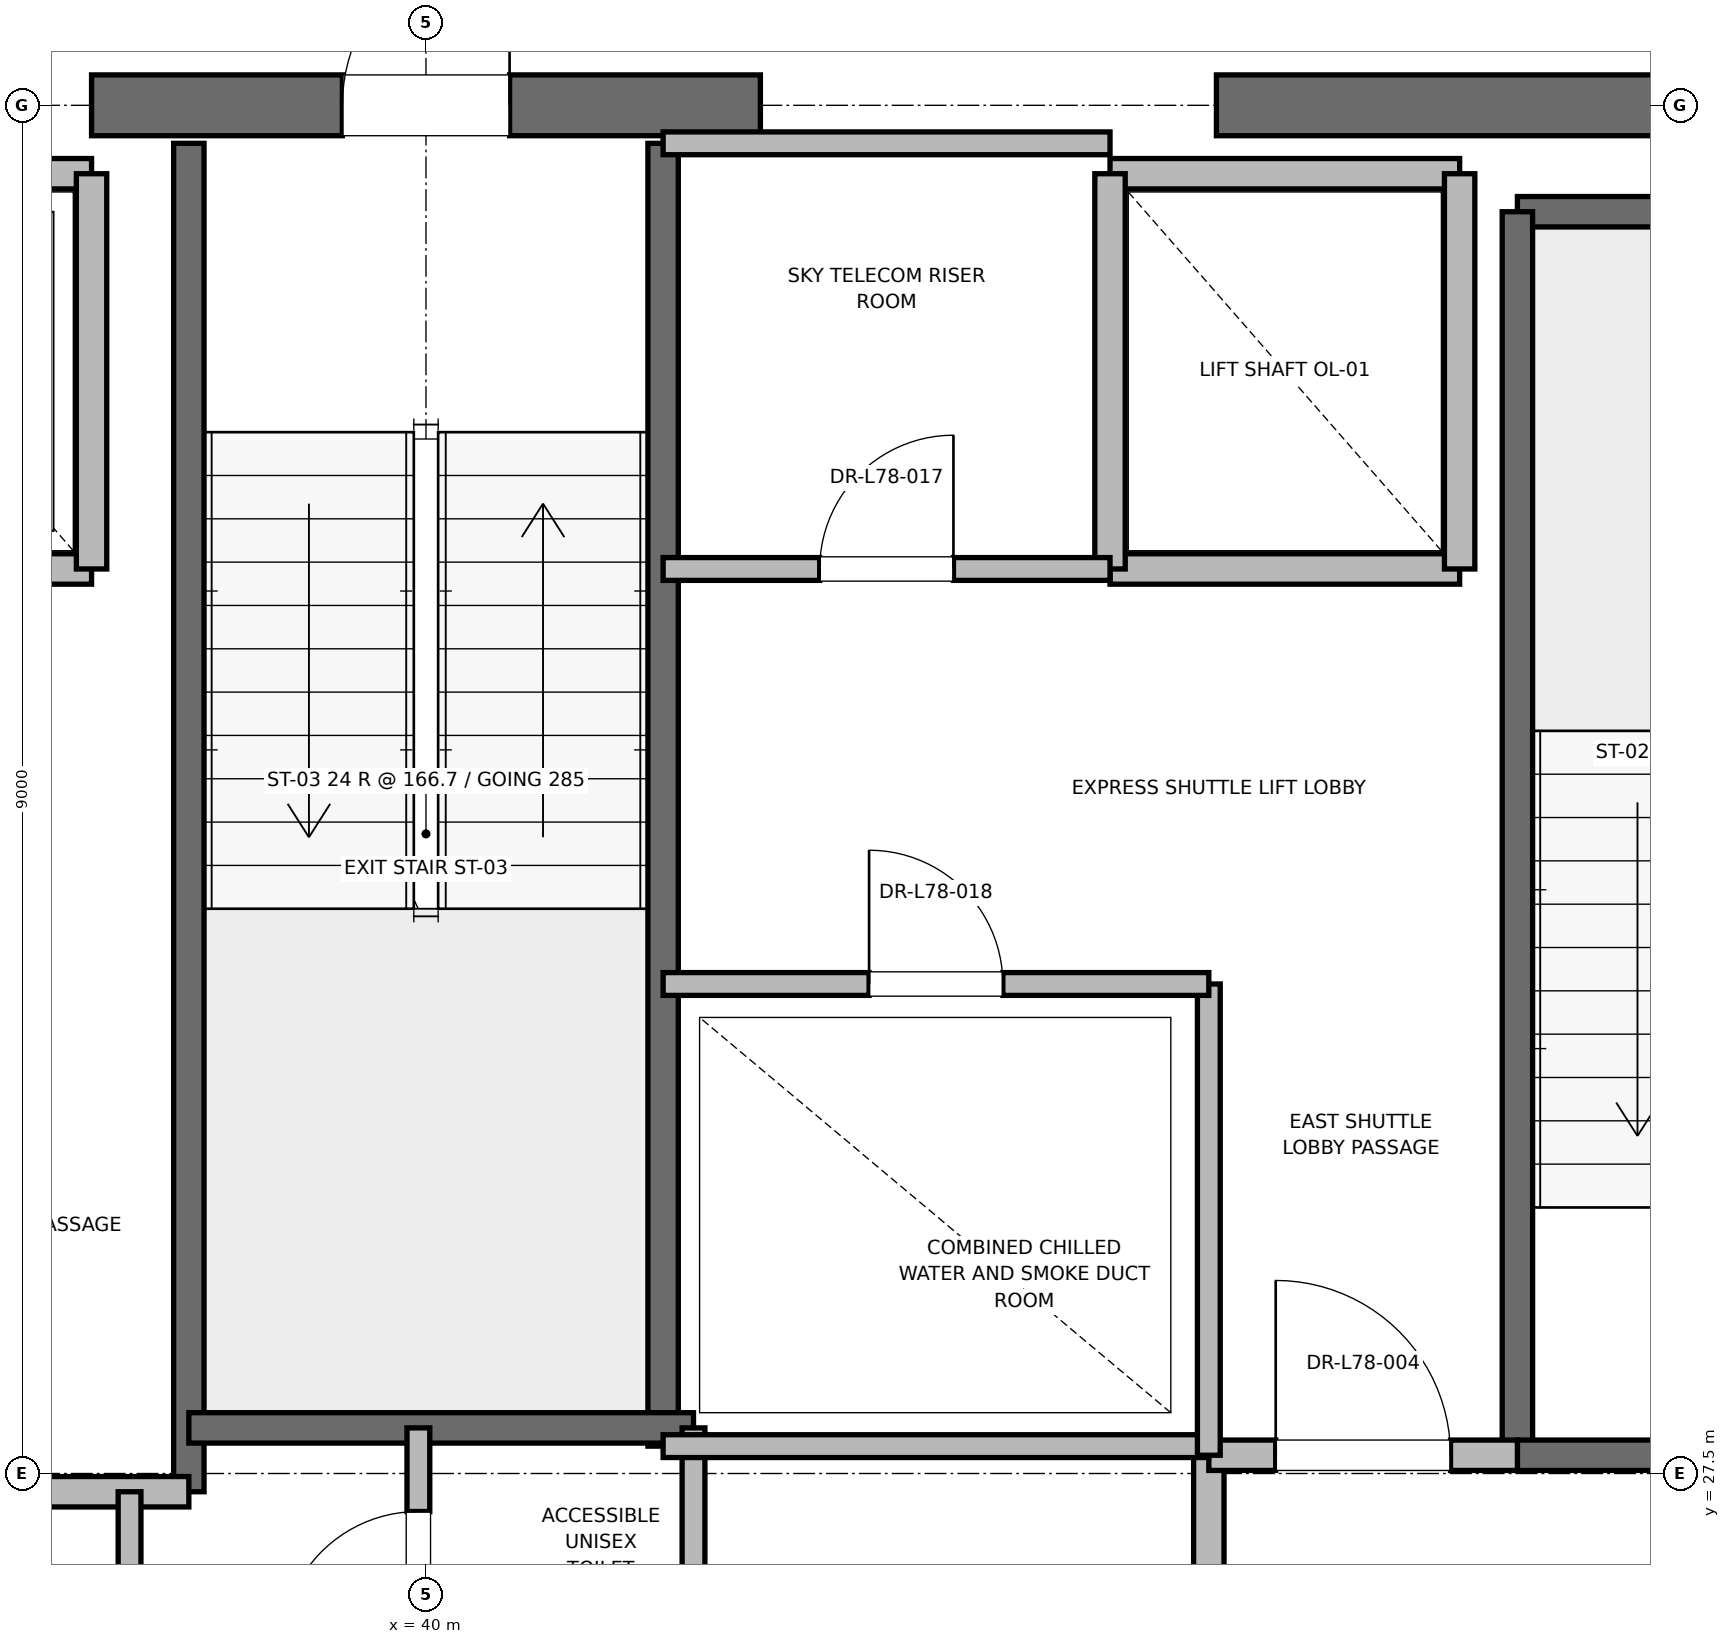
"""IFC4 building model, lengths in metres.
Left out: names, types, materials, properties, quantities, classifications, styles, units other than length and angle.
Written with IfcOpenShell. Run it as: python <this file> out.ifc"""

import sys

from ifc_helpers import new_model, si_unit, direction, frame, frame_2d, origin, place, context, subcontext, project, spatial, rectangle, extrude, element, fill, save


model = new_model("IFC4")
c1 = context("Model", 3, precision=1e-05, world=origin(), true_north=direction((0.0, 1.0)))
c2 = subcontext(c1, "Body", "Model", "MODEL_VIEW")
j1 = project(units=[si_unit("LENGTHUNIT", "METRE"), si_unit("PLANEANGLEUNIT", "RADIAN")], contexts=[c1])
p1 = place(None, origin())
s1 = spatial("IfcSite", under=j1, at=p1, CompositionType="ELEMENT")
p2 = place(p1, origin())
s2 = spatial("IfcBuilding", under=s1, at=p2, CompositionType="ELEMENT")
p3 = place(p2, frame((0.0, 0.0, 334.8)))
s3 = spatial("IfcBuildingStorey", under=s2, at=p3, CompositionType="ELEMENT", Elevation=334.8)
p4 = place(p3, frame((37.8, 36.5, 0.0), z_axis=(0.0, 0.0, 1.0), x_axis=(1.0, 0.0, 0.0)))
e1 = element("IfcWall", 1, at=p4, inside=s3, PredefinedType="SHEAR", context=c2, shape_type="SweptSolid", body=[
    extrude(rectangle(XDim=4.4, YDim=0.4, at=frame_2d((2.2, 0.0))), origin(), (0.0, 0.0, 1.0), 3.785),
])
p5 = place(p4, frame((1.65, 0.0, 0.0)))
e2 = element("IfcOpeningElement", 2, at=p5, cuts=e1, PredefinedType="OPENING", context=c2, shape_type="SweptSolid", body=[
    extrude(rectangle(XDim=1.1, YDim=2.15, at=frame_2d((0.55, 1.075))), frame((0.0, 0.2, 0.0), z_axis=(0.0, -1.0, 0.0), x_axis=(1.0, 0.0, 0.0)), (0.0, 0.0, 1.0), 0.4),
])
p6 = place(p3, frame((45.2, 36.5, 0.0), z_axis=(0.0, 0.0, 1.0), x_axis=(1.0, 0.0, 0.0)))
e3 = element("IfcWall", 3, at=p6, inside=s3, PredefinedType="SHEAR", context=c2, shape_type="SweptSolid", body=[
    extrude(rectangle(XDim=5.8, YDim=0.4, at=frame_2d((2.9, 0.0))), origin(), (0.0, 0.0, 1.0), 3.785),
])
p7 = place(p3, frame((47.18, 35.8, 0.0), z_axis=(0.0, 0.0, 1.0), x_axis=(1.0, 0.0, 0.0)))
e4 = element("IfcWall", 4, at=p7, inside=s3, PredefinedType="SOLIDWALL", context=c2, shape_type="SweptSolid", body=[
    extrude(rectangle(XDim=3.12, YDim=0.2, at=frame_2d((1.56, 0.0))), origin(), (0.0, 0.0, 1.0), 3.785),
])
p8 = place(p3, frame((47.18, 27.62, 0.0), z_axis=(0.0, 0.0, 1.0), x_axis=(0.0, 1.0, 0.0)))
e5 = element("IfcWall", 5, at=p8, inside=s3, PredefinedType="SOLIDWALL", context=c2, shape_type="SweptSolid", body=[
    extrude(rectangle(XDim=8.18, YDim=0.2, at=frame_2d((4.09, 0.0))), origin(), (0.0, 0.0, 1.0), 3.785),
])
p9 = place(p3, frame((47.18, 27.62, 0.0), z_axis=(0.0, 0.0, 1.0), x_axis=(1.0, 0.0, 0.0)))
e6 = element("IfcWall", 6, at=p9, inside=s3, PredefinedType="SOLIDWALL", context=c2, shape_type="SweptSolid", body=[
    extrude(rectangle(XDim=3.12, YDim=0.2, at=frame_2d((1.56, 0.0))), origin(), (0.0, 0.0, 1.0), 3.785),
])
p10 = place(p9, frame((1.01, 0.0, 0.0)))
e7 = element("IfcOpeningElement", 7, at=p10, cuts=e6, PredefinedType="OPENING", context=c2, shape_type="SweptSolid", body=[
    extrude(rectangle(XDim=1.1, YDim=2.15, at=frame_2d((0.55, 1.075))), frame((0.0, 0.1, 0.0), z_axis=(0.0, -1.0, 0.0), x_axis=(1.0, 0.0, 0.0)), (0.0, 0.0, 1.0), 0.2),
])
p11 = place(p3, frame((38.44, 27.38, 0.0), z_axis=(0.0, 0.0, 1.0), x_axis=(0.0, 1.0, 0.0)))
e8 = element("IfcWall", 8, at=p11, inside=s3, PredefinedType="SOLIDWALL", context=c2, shape_type="SweptSolid", body=[
    extrude(rectangle(XDim=8.87, YDim=0.2, at=frame_2d((4.435, 0.0))), origin(), (0.0, 0.0, 1.0), 3.785),
])
p12 = place(p3, frame((41.56, 27.68, 0.0), z_axis=(0.0, 0.0, 1.0), x_axis=(0.0, 1.0, 0.0)))
e9 = element("IfcWall", 9, at=p12, inside=s3, PredefinedType="SOLIDWALL", context=c2, shape_type="SweptSolid", body=[
    extrude(rectangle(XDim=8.57, YDim=0.2, at=frame_2d((4.285, 0.0))), origin(), (0.0, 0.0, 1.0), 3.785),
])
p13 = place(p3, frame((38.44, 27.8, 0.0), z_axis=(0.0, 0.0, 1.0), x_axis=(1.0, 0.0, 0.0)))
e10 = element("IfcWall", 10, at=p13, inside=s3, PredefinedType="SOLIDWALL", context=c2, shape_type="SweptSolid", body=[
    extrude(rectangle(XDim=3.32, YDim=0.2, at=frame_2d((1.66, 0.0))), origin(), (0.0, 0.0, 1.0), 3.785),
])
p14 = place(p3, frame((32.82, 27.38, 0.0), z_axis=(0.0, 0.0, 1.0), x_axis=(1.0, 0.0, 0.0)))
e11 = element("IfcWall", 11, at=p14, inside=s3, PredefinedType="PARTITIONING", context=c2, shape_type="SweptSolid", body=[
    extrude(rectangle(XDim=5.62, YDim=0.2, at=frame_2d((2.81, 0.0))), origin(), (0.0, 0.0, 1.0), 3.785),
])
p15 = place(p3, frame((45.15, 24.25, 0.0), z_axis=(0.0, 0.0, 1.0), x_axis=(0.0, 1.0, 0.0)))
e12 = element("IfcWall", 12, at=p15, inside=s3, PredefinedType="PARTITIONING", context=c2, shape_type="SweptSolid", body=[
    extrude(rectangle(XDim=3.37, YDim=0.2, at=frame_2d((1.685, 0.0))), origin(), (0.0, 0.0, 1.0), 3.785),
])
p16 = place(p3, frame((45.15, 27.62, 0.0), z_axis=(0.0, 0.0, 1.0), x_axis=(1.0, 0.0, 0.0)))
e13 = element("IfcWall", 13, at=p16, inside=s3, PredefinedType="PARTITIONING", context=c2, shape_type="SweptSolid", body=[
    extrude(rectangle(XDim=2.03, YDim=0.2, at=frame_2d((1.015, 0.0))), origin(), (0.0, 0.0, 1.0), 3.785),
])
p17 = place(p16, frame((0.44, 0.0, 0.0)))
e14 = element("IfcOpeningElement", 14, at=p17, cuts=e13, PredefinedType="OPENING", context=c2, shape_type="SweptSolid", body=[
    extrude(rectangle(XDim=1.15, YDim=2.2, at=frame_2d((0.575, 1.1))), frame((0.0, 0.1, 0.0), z_axis=(0.0, -1.0, 0.0), x_axis=(1.0, 0.0, 0.0)), (0.0, 0.0, 1.0), 0.2),
])
p18 = place(p3, frame((35.5, 33.45, 0.0), z_axis=(0.0, 0.0, 1.0), x_axis=(1.0, 0.0, 0.0)))
e15 = element("IfcWall", 15, at=p18, inside=s3, PredefinedType="SOLIDWALL", context=c2, shape_type="SweptSolid", body=[
    extrude(rectangle(XDim=2.3, YDim=0.2, at=frame_2d((1.15, 0.0))), origin(), (0.0, 0.0, 1.0), 3.785),
])
p19 = place(p18, frame((0.6, 0.0, 0.0)))
e16 = element("IfcOpeningElement", 16, at=p19, cuts=e15, PredefinedType="OPENING", context=c2, shape_type="SweptSolid", body=[
    extrude(rectangle(XDim=1.1, YDim=2.2, at=frame_2d((0.55, 1.1))), frame((0.0, 0.1, 0.0), z_axis=(0.0, -1.0, 0.0), x_axis=(1.0, 0.0, 0.0)), (0.0, 0.0, 1.0), 0.2),
])
p20 = place(p3, frame((37.8, 36.05, 0.0), z_axis=(0.0, 0.0, 1.0), x_axis=(-1.0, 0.0, 0.0)))
e17 = element("IfcWall", 17, at=p20, inside=s3, PredefinedType="SOLIDWALL", context=c2, shape_type="SweptSolid", body=[
    extrude(rectangle(XDim=2.3, YDim=0.2, at=frame_2d((1.15, 0.0))), origin(), (0.0, 0.0, 1.0), 2.865),
])
p21 = place(p3, frame((37.8, 33.45, 0.0), z_axis=(0.0, 0.0, 1.0), x_axis=(0.0, 1.0, 0.0)))
e18 = element("IfcWall", 18, at=p21, inside=s3, PredefinedType="SOLIDWALL", context=c2, shape_type="SweptSolid", body=[
    extrude(rectangle(XDim=2.6, YDim=0.2, at=frame_2d((1.3, 0.0))), origin(), (0.0, 0.0, 1.0), 2.865),
])
p22 = place(p3, frame((44.5, 33.45, 0.0), z_axis=(0.0, 0.0, 1.0), x_axis=(1.0, 0.0, 0.0)))
e19 = element("IfcWall", 19, at=p22, inside=s3, PredefinedType="SOLIDWALL", context=c2, shape_type="SweptSolid", body=[
    extrude(rectangle(XDim=2.3, YDim=0.2, at=frame_2d((1.15, 0.0))), origin(), (0.0, 0.0, 1.0), 3.785),
])
p23 = place(p3, frame((46.8, 36.05, 0.0), z_axis=(0.0, 0.0, 1.0), x_axis=(-1.0, 0.0, 0.0)))
e20 = element("IfcWall", 20, at=p23, inside=s3, PredefinedType="SOLIDWALL", context=c2, shape_type="SweptSolid", body=[
    extrude(rectangle(XDim=2.3, YDim=0.2, at=frame_2d((1.15, 0.0))), origin(), (0.0, 0.0, 1.0), 2.865),
])
p24 = place(p3, frame((44.5, 36.05, 0.0), z_axis=(0.0, 0.0, 1.0), x_axis=(0.0, -1.0, 0.0)))
e21 = element("IfcWall", 21, at=p24, inside=s3, PredefinedType="SOLIDWALL", context=c2, shape_type="SweptSolid", body=[
    extrude(rectangle(XDim=2.6, YDim=0.2, at=frame_2d((1.3, 0.0))), origin(), (0.0, 0.0, 1.0), 2.865),
])
p25 = place(p3, frame((46.8, 33.45, 0.0), z_axis=(0.0, 0.0, 1.0), x_axis=(0.0, 1.0, 0.0)))
e22 = element("IfcWall", 22, at=p25, inside=s3, PredefinedType="SOLIDWALL", context=c2, shape_type="SweptSolid", body=[
    extrude(rectangle(XDim=2.6, YDim=0.2, at=frame_2d((1.3, 0.0))), origin(), (0.0, 0.0, 1.0), 3.785),
])
p26 = place(p3, frame((41.76, 23.8, 0.0), z_axis=(0.0, 0.0, 1.0), x_axis=(0.0, 1.0, 0.0)))
e23 = element("IfcWall", 23, at=p26, inside=s3, PredefinedType="PARTITIONING", context=c2, shape_type="SweptSolid", body=[
    extrude(rectangle(XDim=4.0, YDim=0.15, at=frame_2d((2.0, 0.0))), origin(), (0.0, 0.0, 1.0), 2.85),
])
p27 = place(p3, frame((39.95, 25.8, 0.0), z_axis=(0.0, 0.0, 1.0), x_axis=(0.0, 1.0, 0.0)))
e24 = element("IfcWall", 24, at=p27, inside=s3, PredefinedType="PARTITIONING", context=c2, shape_type="SweptSolid", body=[
    extrude(rectangle(XDim=2.0, YDim=0.15, at=frame_2d((1.0, 0.0))), origin(), (0.0, 0.0, 1.0), 2.85),
])
p28 = place(p27, frame((0.55, 0.0, 0.0)))
e25 = element("IfcOpeningElement", 25, at=p28, cuts=e24, PredefinedType="OPENING", context=c2, shape_type="SweptSolid", body=[
    extrude(rectangle(XDim=0.9, YDim=2.1, at=frame_2d((0.45, 1.05))), frame((0.0, 0.075, 0.0), z_axis=(0.0, -1.0, 0.0), x_axis=(1.0, 0.0, 0.0)), (0.0, 0.0, 1.0), 0.15),
])
p29 = place(p3, frame((38.05, 18.6, 0.0), z_axis=(0.0, 0.0, 1.0), x_axis=(0.0, 1.0, 0.0)))
e26 = element("IfcWall", 26, at=p29, inside=s3, PredefinedType="PARTITIONING", context=c2, shape_type="SweptSolid", body=[
    extrude(rectangle(XDim=8.78, YDim=0.15, at=frame_2d((4.39, 0.0))), origin(), (0.0, 0.0, 1.0), 2.85),
])
p30 = place(p29, frame((3.89, 0.0, 0.0)))
e27 = element("IfcOpeningElement", 27, at=p30, cuts=e26, PredefinedType="OPENING", context=c2, shape_type="SweptSolid", body=[
    extrude(rectangle(XDim=1.0, YDim=2.15, at=frame_2d((0.5, 1.075))), frame((0.0, 0.075, 0.0), z_axis=(0.0, -1.0, 0.0), x_axis=(1.0, 0.0, 0.0)), (0.0, 0.0, 1.0), 0.15),
])
p31 = place(p3, frame((41.56, 27.68, 0.0), z_axis=(0.0, 0.0, 1.0), x_axis=(1.0, 0.0, 0.0)))
e28 = element("IfcWall", 28, at=p31, inside=s3, PredefinedType="PARTITIONING", context=c2, shape_type="SweptSolid", body=[
    extrude(rectangle(XDim=3.59, YDim=0.15, at=frame_2d((1.795, 0.0))), origin(), (0.0, 0.0, 1.0), 2.85),
])
p32 = place(p3, frame((45.15, 27.62, 0.0), z_axis=(0.0, 0.0, 1.0), x_axis=(0.0, 1.0, 0.0)))
e29 = element("IfcWall", 29, at=p32, inside=s3, PredefinedType="PARTITIONING", context=c2, shape_type="SweptSolid", body=[
    extrude(rectangle(XDim=3.1, YDim=0.15, at=frame_2d((1.55, 0.0))), origin(), (0.0, 0.0, 1.0), 2.85),
])
p33 = place(p3, frame((41.56, 30.72, 0.0), z_axis=(0.0, 0.0, 1.0), x_axis=(1.0, 0.0, 0.0)))
e30 = element("IfcWall", 30, at=p33, inside=s3, PredefinedType="PARTITIONING", context=c2, shape_type="SweptSolid", body=[
    extrude(rectangle(XDim=3.59, YDim=0.15, at=frame_2d((1.795, 0.0))), origin(), (0.0, 0.0, 1.0), 2.85),
])
p34 = place(p33, frame((1.355, 0.0, 0.0)))
e31 = element("IfcOpeningElement", 31, at=p34, cuts=e30, PredefinedType="OPENING", context=c2, shape_type="SweptSolid", body=[
    extrude(rectangle(XDim=0.88, YDim=2.1, at=frame_2d((0.44, 1.05))), frame((0.0, 0.075, 0.0), z_axis=(0.0, -1.0, 0.0), x_axis=(1.0, 0.0, 0.0)), (0.0, 0.0, 1.0), 0.15),
])
p35 = place(p3, frame((41.56, 36.25, 0.0), z_axis=(0.0, 0.0, 1.0), x_axis=(1.0, 0.0, 0.0)))
e32 = element("IfcWall", 32, at=p35, inside=s3, PredefinedType="PARTITIONING", context=c2, shape_type="SweptSolid", body=[
    extrude(rectangle(XDim=2.94, YDim=0.15, at=frame_2d((1.47, 0.0))), origin(), (0.0, 0.0, 1.0), 2.85),
])
p36 = place(p3, frame((41.56, 33.45, 0.0), z_axis=(0.0, 0.0, 1.0), x_axis=(1.0, 0.0, 0.0)))
e33 = element("IfcWall", 33, at=p36, inside=s3, PredefinedType="PARTITIONING", context=c2, shape_type="SweptSolid", body=[
    extrude(rectangle(XDim=2.94, YDim=0.15, at=frame_2d((1.47, 0.0))), origin(), (0.0, 0.0, 1.0), 2.85),
])
p37 = place(p36, frame((1.03, 0.0, 0.0)))
e34 = element("IfcOpeningElement", 34, at=p37, cuts=e33, PredefinedType="OPENING", context=c2, shape_type="SweptSolid", body=[
    extrude(rectangle(XDim=0.88, YDim=2.1, at=frame_2d((0.44, 1.05))), frame((0.0, 0.075, 0.0), z_axis=(0.0, -1.0, 0.0), x_axis=(1.0, 0.0, 0.0)), (0.0, 0.0, 1.0), 0.15),
])
p38 = place(p5, origin())
e35 = element("IfcDoor", 35, at=p38, inside=s3, OperationType="SINGLE_SWING_RIGHT", PredefinedType="DOOR", context=c2, shape_type="SweptSolid", body=[
    extrude(rectangle(XDim=1.1, YDim=2.15, at=frame_2d((0.55, 1.075))), frame((0.0, 0.025, 0.0), z_axis=(0.0, -1.0, 0.0), x_axis=(1.0, 0.0, 0.0)), (0.0, 0.0, 1.0), 0.05),
])
fill(e2, e35)
p39 = place(p17, origin())
e36 = element("IfcDoor", 36, at=p39, inside=s3, OperationType="SINGLE_SWING_LEFT", PredefinedType="DOOR", context=c2, shape_type="SweptSolid", body=[
    extrude(rectangle(XDim=1.15, YDim=2.2, at=frame_2d((0.575, 1.1))), frame((0.0, 0.025, 0.0), z_axis=(0.0, -1.0, 0.0), x_axis=(1.0, 0.0, 0.0)), (0.0, 0.0, 1.0), 0.05),
])
fill(e14, e36)
p40 = place(p28, origin())
e37 = element("IfcDoor", 37, at=p40, inside=s3, OperationType="SINGLE_SWING_LEFT", PredefinedType="DOOR", context=c2, shape_type="SweptSolid", body=[
    extrude(rectangle(XDim=0.9, YDim=2.1, at=frame_2d((0.45, 1.05))), frame((0.0, 0.025, 0.0), z_axis=(0.0, -1.0, 0.0), x_axis=(1.0, 0.0, 0.0)), (0.0, 0.0, 1.0), 0.05),
])
fill(e25, e37)
p41 = place(p34, origin())
e38 = element("IfcDoor", 38, at=p41, inside=s3, OperationType="SINGLE_SWING_LEFT", PredefinedType="DOOR", context=c2, shape_type="SweptSolid", body=[
    extrude(rectangle(XDim=0.88, YDim=2.1, at=frame_2d((0.44, 1.05))), frame((0.0, 0.025, 0.0), z_axis=(0.0, -1.0, 0.0), x_axis=(1.0, 0.0, 0.0)), (0.0, 0.0, 1.0), 0.05),
])
fill(e31, e38)
p42 = place(p37, origin())
e39 = element("IfcDoor", 39, at=p42, inside=s3, OperationType="SINGLE_SWING_RIGHT", PredefinedType="DOOR", context=c2, shape_type="SweptSolid", body=[
    extrude(rectangle(XDim=0.88, YDim=2.1, at=frame_2d((0.44, 1.05))), frame((0.0, 0.025, 0.0), z_axis=(0.0, -1.0, 0.0), x_axis=(1.0, 0.0, 0.0)), (0.0, 0.0, 1.0), 0.05),
])
fill(e34, e39)
save(model, sys.argv[1])
